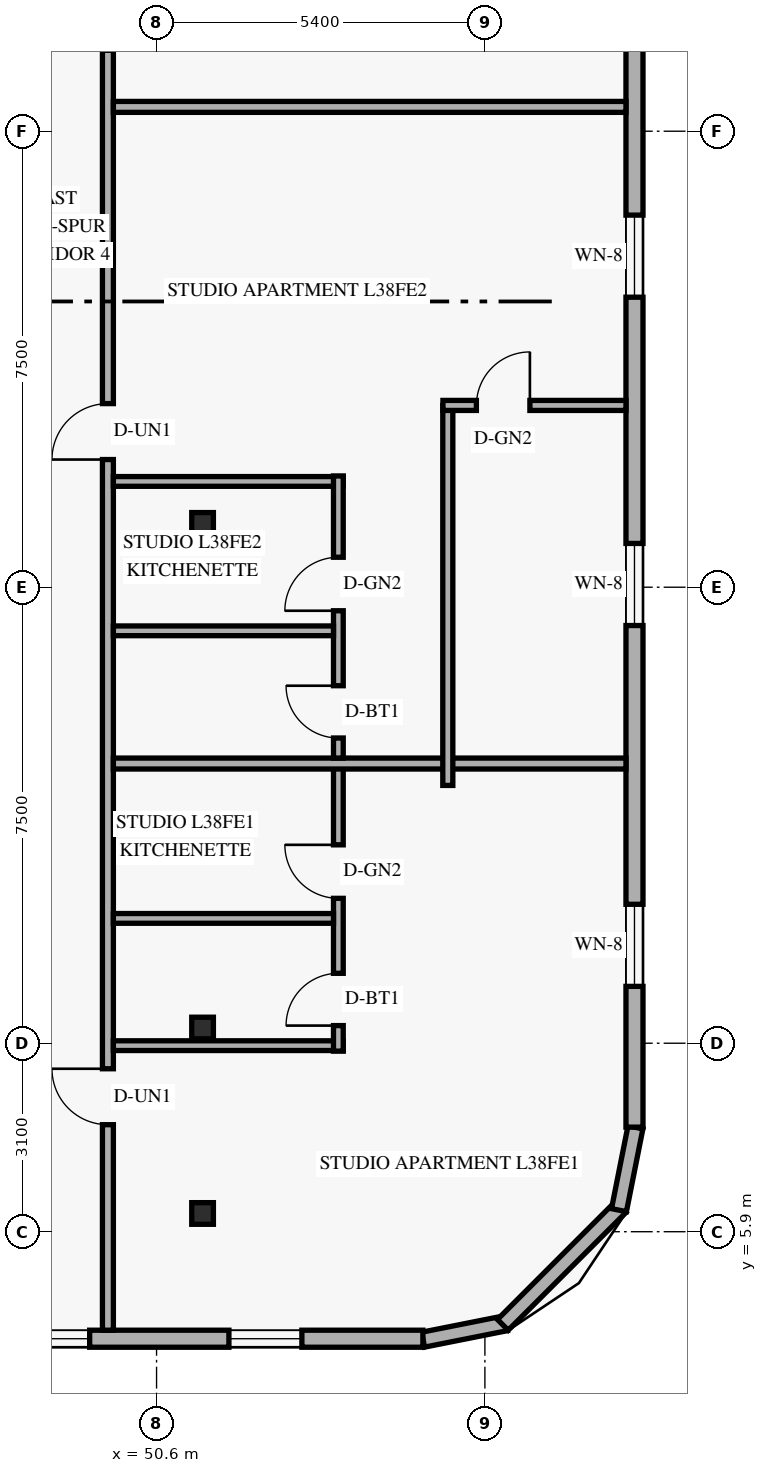
"""IFC4 building model, lengths in metres.
Left out: names, types, materials, properties, quantities, classifications, styles, units other than length and angle.
Written with IfcOpenShell. Run it as: python <this file> out.ifc"""

import sys

from ifc_helpers import new_model, si_unit, direction, frame, frame_2d, origin, origin_2d, place, context, subcontext, project, spatial, rectangle, hollow_rectangle, extrude, element, fill, save


model = new_model("IFC4")
c1 = context("Model", 3, precision=1e-05, world=origin(), true_north=direction((0.0, 1.0)))
c2 = subcontext(c1, "Body", "Model", "MODEL_VIEW")
j1 = project(units=[si_unit("LENGTHUNIT", "METRE"), si_unit("PLANEANGLEUNIT", "RADIAN")], contexts=[c1])
p1 = place(None, origin())
s1 = spatial("IfcSite", under=j1, at=p1, CompositionType="ELEMENT")
p2 = place(p1, origin())
s2 = spatial("IfcBuilding", under=s1, at=p2, CompositionType="ELEMENT")
p3 = place(p2, frame((0.0, 0.0, 148.2)))
s3 = spatial("IfcBuildingStorey", under=s2, at=p3, CompositionType="ELEMENT", Elevation=148.2)
for number, where, z_axis, x_axis in (
    (1, (51.252, 6.2, 0.0), (0.058, 0.0, 0.998), (0.0, 1.0, 0.0)),
    (2, (51.252, 9.25, 0.0), (0.058, 0.0, 0.998), (0.0, 1.0, 0.0)),
    (3, (51.252, 17.55, 0.0), (0.058, 0.0, 0.998), (0.0, 1.0, 0.0)),
):
    element("IfcColumn", number, at=place(p3, frame(where, z_axis=z_axis, x_axis=x_axis)), inside=s3, PredefinedType="COLUMN", context=c2, shape_type="SweptSolid", body=[
        extrude(hollow_rectangle(XDim=0.356, YDim=0.356, WallThickness=0.016, at=origin_2d()), origin(), (0.0, 0.0, 1.0), 3.606),
    ])
p4 = place(p3, frame((54.983, 4.124, 0.0), z_axis=(0.0, 0.0, 1.0), x_axis=(0.980809899341, 0.19496651342, 0.0)))
e4 = element("IfcWall", 4, at=p4, inside=s3, PredefinedType="SOLIDWALL", context=c2, shape_type="SweptSolid", body=[
    extrude(rectangle(XDim=1.389, YDim=0.25, at=frame_2d((0.694, 0.0))), origin(), (0.0, 0.0, 1.0), 3.36),
])
p5 = place(p3, frame((56.295, 4.368, 0.0), z_axis=(0.0, 0.0, 1.0), x_axis=(0.707106781187, 0.707106781187, 0.0)))
e5 = element("IfcWall", 5, at=p5, inside=s3, PredefinedType="SOLIDWALL", context=c2, shape_type="SweptSolid", body=[
    extrude(rectangle(XDim=2.739, YDim=0.25, at=frame_2d((1.37, 0.0))), origin(), (0.0, 0.0, 1.0), 3.36),
])
p6 = place(p3, frame((58.205, 6.254, 0.0), z_axis=(0.0, 0.0, 1.0), x_axis=(0.19496651342, 0.980809899341, 0.0)))
e6 = element("IfcWall", 6, at=p6, inside=s3, PredefinedType="SOLIDWALL", context=c2, shape_type="SweptSolid", body=[
    extrude(rectangle(XDim=1.389, YDim=0.25, at=frame_2d((0.694, 0.0))), origin(), (0.0, 0.0, 1.0), 3.36),
])
p7 = place(p3, frame((21.22, 4.14, 0.0), z_axis=(0.0, 0.0, 1.0), x_axis=(1.0, 0.0, 0.0)))
e7 = element("IfcWall", 7, at=p7, inside=s3, PredefinedType="SOLIDWALL", context=c2, shape_type="SweptSolid", body=[
    extrude(rectangle(XDim=33.76, YDim=0.28, at=frame_2d((16.88, 0.0))), origin(), (0.0, 0.0, 1.0), 3.36),
])
p8 = place(p7, frame((2.905, 0.0, 0.85)))
e8 = element("IfcOpeningElement", 8, at=p8, cuts=e7, PredefinedType="OPENING", context=c2, shape_type="SweptSolid", body=[
    extrude(rectangle(XDim=1.2, YDim=1.5, at=frame_2d((0.6, 0.75))), frame((0.0, 0.15, 0.0), z_axis=(0.0, -1.0, 0.0), x_axis=(1.0, 0.0, 0.0)), (0.0, 0.0, 1.0), 0.3),
])
p9 = place(p7, frame((9.79, 0.0, 0.85)))
e9 = element("IfcOpeningElement", 9, at=p9, cuts=e7, PredefinedType="OPENING", context=c2, shape_type="SweptSolid", body=[
    extrude(rectangle(XDim=1.2, YDim=1.5, at=frame_2d((0.6, 0.75))), frame((0.0, 0.15, 0.0), z_axis=(0.0, -1.0, 0.0), x_axis=(1.0, 0.0, 0.0)), (0.0, 0.0, 1.0), 0.3),
])
p10 = place(p7, frame((15.065, 0.0, 0.85)))
e10 = element("IfcOpeningElement", 10, at=p10, cuts=e7, PredefinedType="OPENING", context=c2, shape_type="SweptSolid", body=[
    extrude(rectangle(XDim=1.2, YDim=1.5, at=frame_2d((0.6, 0.75))), frame((0.0, 0.15, 0.0), z_axis=(0.0, -1.0, 0.0), x_axis=(1.0, 0.0, 0.0)), (0.0, 0.0, 1.0), 0.3),
])
p11 = place(p7, frame((19.625, 0.0, 0.85)))
e11 = element("IfcOpeningElement", 11, at=p11, cuts=e7, PredefinedType="OPENING", context=c2, shape_type="SweptSolid", body=[
    extrude(rectangle(XDim=1.2, YDim=1.5, at=frame_2d((0.6, 0.75))), frame((0.0, 0.15, 0.0), z_axis=(0.0, -1.0, 0.0), x_axis=(1.0, 0.0, 0.0)), (0.0, 0.0, 1.0), 0.3),
])
p12 = place(p7, frame((24.45, 0.0, 0.85)))
e12 = element("IfcOpeningElement", 12, at=p12, cuts=e7, PredefinedType="OPENING", context=c2, shape_type="SweptSolid", body=[
    extrude(rectangle(XDim=1.2, YDim=1.5, at=frame_2d((0.6, 0.75))), frame((0.0, 0.15, 0.0), z_axis=(0.0, -1.0, 0.0), x_axis=(1.0, 0.0, 0.0)), (0.0, 0.0, 1.0), 0.3),
])
p13 = place(p7, frame((27.08, 0.0, 0.85)))
e13 = element("IfcOpeningElement", 13, at=p13, cuts=e7, PredefinedType="OPENING", context=c2, shape_type="SweptSolid", body=[
    extrude(rectangle(XDim=1.2, YDim=1.5, at=frame_2d((0.6, 0.75))), frame((0.0, 0.15, 0.0), z_axis=(0.0, -1.0, 0.0), x_axis=(1.0, 0.0, 0.0)), (0.0, 0.0, 1.0), 0.3),
])
p14 = place(p7, frame((30.57, 0.0, 0.85)))
e14 = element("IfcOpeningElement", 14, at=p14, cuts=e7, PredefinedType="OPENING", context=c2, shape_type="SweptSolid", body=[
    extrude(rectangle(XDim=1.2, YDim=1.5, at=frame_2d((0.6, 0.75))), frame((0.0, 0.15, 0.0), z_axis=(0.0, -1.0, 0.0), x_axis=(1.0, 0.0, 0.0)), (0.0, 0.0, 1.0), 0.3),
])
p15 = place(p3, frame((58.46, 7.62, 0.0), z_axis=(0.0, 0.0, 1.0), x_axis=(0.0, 1.0, 0.0)))
e15 = element("IfcWall", 15, at=p15, inside=s3, PredefinedType="SOLIDWALL", context=c2, shape_type="SweptSolid", body=[
    extrude(rectangle(XDim=32.76, YDim=0.28, at=frame_2d((16.38, 0.0))), origin(), (0.0, 0.0, 1.0), 3.36),
])
p16 = place(p15, frame((2.315, 0.0, 0.85)))
e16 = element("IfcOpeningElement", 16, at=p16, cuts=e15, PredefinedType="OPENING", context=c2, shape_type="SweptSolid", body=[
    extrude(rectangle(XDim=1.35, YDim=1.55, at=frame_2d((0.675, 0.775))), frame((0.0, 0.15, 0.0), z_axis=(0.0, -1.0, 0.0), x_axis=(1.0, 0.0, 0.0)), (0.0, 0.0, 1.0), 0.3),
])
p17 = place(p15, frame((8.25, 0.0, 0.85)))
e17 = element("IfcOpeningElement", 17, at=p17, cuts=e15, PredefinedType="OPENING", context=c2, shape_type="SweptSolid", body=[
    extrude(rectangle(XDim=1.35, YDim=1.55, at=frame_2d((0.675, 0.775))), frame((0.0, 0.15, 0.0), z_axis=(0.0, -1.0, 0.0), x_axis=(1.0, 0.0, 0.0)), (0.0, 0.0, 1.0), 0.3),
])
p18 = place(p15, frame((13.65, 0.0, 0.85)))
e18 = element("IfcOpeningElement", 18, at=p18, cuts=e15, PredefinedType="OPENING", context=c2, shape_type="SweptSolid", body=[
    extrude(rectangle(XDim=1.35, YDim=1.55, at=frame_2d((0.675, 0.775))), frame((0.0, 0.15, 0.0), z_axis=(0.0, -1.0, 0.0), x_axis=(1.0, 0.0, 0.0)), (0.0, 0.0, 1.0), 0.3),
])
p19 = place(p15, frame((19.574, 0.0, 0.85)))
e19 = element("IfcOpeningElement", 19, at=p19, cuts=e15, PredefinedType="OPENING", context=c2, shape_type="SweptSolid", body=[
    extrude(rectangle(XDim=1.35, YDim=1.55, at=frame_2d((0.675, 0.775))), frame((0.0, 0.15, 0.0), z_axis=(0.0, -1.0, 0.0), x_axis=(1.0, 0.0, 0.0)), (0.0, 0.0, 1.0), 0.3),
])
p20 = place(p15, frame((24.774, 0.0, 0.85)))
e20 = element("IfcOpeningElement", 20, at=p20, cuts=e15, PredefinedType="OPENING", context=c2, shape_type="SweptSolid", body=[
    extrude(rectangle(XDim=1.35, YDim=1.55, at=frame_2d((0.675, 0.775))), frame((0.0, 0.15, 0.0), z_axis=(0.0, -1.0, 0.0), x_axis=(1.0, 0.0, 0.0)), (0.0, 0.0, 1.0), 0.3),
])
p21 = place(p15, frame((29.295, 0.0, 0.85)))
e21 = element("IfcOpeningElement", 21, at=p21, cuts=e15, PredefinedType="OPENING", context=c2, shape_type="SweptSolid", body=[
    extrude(rectangle(XDim=1.35, YDim=1.55, at=frame_2d((0.675, 0.775))), frame((0.0, 0.15, 0.0), z_axis=(0.0, -1.0, 0.0), x_axis=(1.0, 0.0, 0.0)), (0.0, 0.0, 1.0), 0.3),
])
p22 = place(p3, frame((49.8, 4.28, 0.0), z_axis=(0.0, 0.0, 1.0), x_axis=(0.0, 1.0, 0.0)))
e22 = element("IfcWall", 22, at=p22, inside=s3, PredefinedType="STANDARD", context=c2, shape_type="SweptSolid", body=[
    extrude(rectangle(XDim=39.44, YDim=0.18, at=frame_2d((19.72, 0.0))), origin(), (0.0, 0.0, 1.0), 2.73),
])
p23 = place(p22, frame((3.38, 0.0, 0.0)))
e23 = element("IfcOpeningElement", 23, at=p23, cuts=e22, PredefinedType="OPENING", context=c2, shape_type="SweptSolid", body=[
    extrude(rectangle(XDim=0.92, YDim=2.15, at=frame_2d((0.46, 1.075))), frame((0.0, 0.1, 0.0), z_axis=(0.0, -1.0, 0.0), x_axis=(1.0, 0.0, 0.0)), (0.0, 0.0, 1.0), 0.2),
])
p24 = place(p22, frame((14.32, 0.0, 0.0)))
e24 = element("IfcOpeningElement", 24, at=p24, cuts=e22, PredefinedType="OPENING", context=c2, shape_type="SweptSolid", body=[
    extrude(rectangle(XDim=0.92, YDim=2.15, at=frame_2d((0.46, 1.075))), frame((0.0, 0.1, 0.0), z_axis=(0.0, -1.0, 0.0), x_axis=(1.0, 0.0, 0.0)), (0.0, 0.0, 1.0), 0.2),
])
p25 = place(p22, frame((21.05, 0.0, 0.0)))
e25 = element("IfcOpeningElement", 25, at=p25, cuts=e22, PredefinedType="OPENING", context=c2, shape_type="SweptSolid", body=[
    extrude(rectangle(XDim=0.92, YDim=2.15, at=frame_2d((0.46, 1.075))), frame((0.0, 0.1, 0.0), z_axis=(0.0, -1.0, 0.0), x_axis=(1.0, 0.0, 0.0)), (0.0, 0.0, 1.0), 0.2),
])
p26 = place(p22, frame((35.42, 0.0, 0.0)))
e26 = element("IfcOpeningElement", 26, at=p26, cuts=e22, PredefinedType="OPENING", context=c2, shape_type="SweptSolid", body=[
    extrude(rectangle(XDim=0.92, YDim=2.15, at=frame_2d((0.46, 1.075))), frame((0.0, 0.1, 0.0), z_axis=(0.0, -1.0, 0.0), x_axis=(1.0, 0.0, 0.0)), (0.0, 0.0, 1.0), 0.2),
])
p27 = place(p3, frame((49.89, 8.96, 0.0), z_axis=(0.0, 0.0, 1.0), x_axis=(1.0, 0.0, 0.0)))
e27 = element("IfcWall", 27, at=p27, inside=s3, PredefinedType="PLUMBINGWALL", context=c2, shape_type="SweptSolid", body=[
    extrude(rectangle(XDim=3.78, YDim=0.16, at=frame_2d((1.89, 0.0))), origin(), (0.0, 0.0, 1.0), 2.879),
])
p28 = place(p3, frame((53.59, 8.87, 0.0), z_axis=(0.0, 0.0, 1.0), x_axis=(0.0, 1.0, 0.0)))
e28 = element("IfcWall", 28, at=p28, inside=s3, PredefinedType="PLUMBINGWALL", context=c2, shape_type="SweptSolid", body=[
    extrude(rectangle(XDim=4.73, YDim=0.16, at=frame_2d((2.365, 0.0))), origin(), (0.0, 0.0, 1.0), 3.36),
])
p29 = place(p28, frame((0.42, 0.0, 0.0)))
e29 = element("IfcOpeningElement", 29, at=p29, cuts=e28, PredefinedType="OPENING", context=c2, shape_type="SweptSolid", body=[
    extrude(rectangle(XDim=0.86, YDim=2.12, at=frame_2d((0.43, 1.06))), frame((0.0, 0.09, 0.0), z_axis=(0.0, -1.0, 0.0), x_axis=(1.0, 0.0, 0.0)), (0.0, 0.0, 1.0), 0.18),
])
p30 = place(p28, frame((2.513, 0.0, 0.0)))
e30 = element("IfcOpeningElement", 30, at=p30, cuts=e28, PredefinedType="OPENING", context=c2, shape_type="SweptSolid", body=[
    extrude(rectangle(XDim=0.88, YDim=2.12, at=frame_2d((0.44, 1.06))), frame((0.0, 0.09, 0.0), z_axis=(0.0, -1.0, 0.0), x_axis=(1.0, 0.0, 0.0)), (0.0, 0.0, 1.0), 0.18),
])
p31 = place(p3, frame((49.89, 11.053, 0.0), z_axis=(0.0, 0.0, 1.0), x_axis=(1.0, 0.0, 0.0)))
e31 = element("IfcWall", 31, at=p31, inside=s3, PredefinedType="PLUMBINGWALL", context=c2, shape_type="SweptSolid", body=[
    extrude(rectangle(XDim=3.62, YDim=0.16, at=frame_2d((1.81, 0.0))), origin(), (0.0, 0.0, 1.0), 2.879),
])
p32 = place(p3, frame((49.89, 13.6, 0.0), z_axis=(0.0, 0.0, 1.0), x_axis=(1.0, 0.0, 0.0)))
e32 = element("IfcWall", 32, at=p32, inside=s3, PredefinedType="PARTITIONING", context=c2, shape_type="SweptSolid", body=[
    extrude(rectangle(XDim=8.43, YDim=0.18, at=frame_2d((4.215, 0.0))), origin(), (0.0, 0.0, 1.0), 2.879),
])
p33 = place(p3, frame((49.89, 18.24, 0.0), z_axis=(0.0, 0.0, 1.0), x_axis=(1.0, 0.0, 0.0)))
e33 = element("IfcWall", 33, at=p33, inside=s3, PredefinedType="PLUMBINGWALL", context=c2, shape_type="SweptSolid", body=[
    extrude(rectangle(XDim=3.78, YDim=0.16, at=frame_2d((1.89, 0.0))), origin(), (0.0, 0.0, 1.0), 2.879),
])
p34 = place(p3, frame((53.59, 13.69, 0.0), z_axis=(0.0, 0.0, 1.0), x_axis=(0.0, 1.0, 0.0)))
e34 = element("IfcWall", 34, at=p34, inside=s3, PredefinedType="PLUMBINGWALL", context=c2, shape_type="SweptSolid", body=[
    extrude(rectangle(XDim=4.64, YDim=0.16, at=frame_2d((2.32, 0.0))), origin(), (0.0, 0.0, 1.0), 3.36),
])
p35 = place(p34, frame((0.33, 0.0, 0.0)))
e35 = element("IfcOpeningElement", 35, at=p35, cuts=e34, PredefinedType="OPENING", context=c2, shape_type="SweptSolid", body=[
    extrude(rectangle(XDim=0.86, YDim=2.12, at=frame_2d((0.43, 1.06))), frame((0.0, 0.09, 0.0), z_axis=(0.0, -1.0, 0.0), x_axis=(1.0, 0.0, 0.0)), (0.0, 0.0, 1.0), 0.18),
])
p36 = place(p34, frame((2.423, 0.0, 0.0)))
e36 = element("IfcOpeningElement", 36, at=p36, cuts=e34, PredefinedType="OPENING", context=c2, shape_type="SweptSolid", body=[
    extrude(rectangle(XDim=0.88, YDim=2.12, at=frame_2d((0.44, 1.06))), frame((0.0, 0.09, 0.0), z_axis=(0.0, -1.0, 0.0), x_axis=(1.0, 0.0, 0.0)), (0.0, 0.0, 1.0), 0.18),
])
p37 = place(p3, frame((49.89, 15.783, 0.0), z_axis=(0.0, 0.0, 1.0), x_axis=(1.0, 0.0, 0.0)))
e37 = element("IfcWall", 37, at=p37, inside=s3, PredefinedType="PLUMBINGWALL", context=c2, shape_type="SweptSolid", body=[
    extrude(rectangle(XDim=3.62, YDim=0.16, at=frame_2d((1.81, 0.0))), origin(), (0.0, 0.0, 1.0), 2.879),
])
p38 = place(p3, frame((55.39, 13.24, 0.0), z_axis=(0.0, 0.0, 1.0), x_axis=(0.0, 1.0, 0.0)))
e38 = element("IfcWall", 38, at=p38, inside=s3, PredefinedType="PARTITIONING", context=c2, shape_type="SweptSolid", body=[
    extrude(rectangle(XDim=6.25, YDim=0.165, at=frame_2d((3.125, 0.0))), origin(), (0.0, 0.0, 1.0), 3.36),
])
p39 = place(p3, frame((55.31, 19.49, 0.0), z_axis=(0.0, 0.0, 1.0), x_axis=(1.0, 0.0, 0.0)))
e39 = element("IfcWall", 39, at=p39, inside=s3, PredefinedType="PARTITIONING", context=c2, shape_type="SweptSolid", body=[
    extrude(rectangle(XDim=3.01, YDim=0.165, at=frame_2d((1.505, 0.0))), origin(), (0.0, 0.0, 1.0), 3.36),
])
p40 = place(p39, frame((0.55, 0.0, 0.0)))
e40 = element("IfcOpeningElement", 40, at=p40, cuts=e39, PredefinedType="OPENING", context=c2, shape_type="SweptSolid", body=[
    extrude(rectangle(XDim=0.88, YDim=2.12, at=frame_2d((0.44, 1.06))), frame((0.0, 0.093, 0.0), z_axis=(0.0, -1.0, 0.0), x_axis=(1.0, 0.0, 0.0)), (0.0, 0.0, 1.0), 0.185),
])
p41 = place(p3, frame((49.89, 24.4, 0.0), z_axis=(0.0, 0.0, 1.0), x_axis=(1.0, 0.0, 0.0)))
e41 = element("IfcWall", 41, at=p41, inside=s3, PredefinedType="PARTITIONING", context=c2, shape_type="SweptSolid", body=[
    extrude(rectangle(XDim=8.43, YDim=0.18, at=frame_2d((4.215, 0.0))), origin(), (0.0, 0.0, 1.0), 2.879),
])
p42 = place(p13, origin())
e42 = element("IfcWindow", 42, at=p42, inside=s3, PartitioningType="SINGLE_PANEL", PredefinedType="WINDOW", context=c2, shape_type="SweptSolid", body=[
    extrude(rectangle(XDim=1.2, YDim=1.5, at=frame_2d((0.6, 0.75))), frame((0.0, 0.03, 0.0), z_axis=(0.0, -1.0, 0.0), x_axis=(1.0, 0.0, 0.0)), (0.0, 0.0, 1.0), 0.06),
])
fill(e13, e42)
p43 = place(p14, origin())
e43 = element("IfcWindow", 43, at=p43, inside=s3, PartitioningType="SINGLE_PANEL", PredefinedType="WINDOW", context=c2, shape_type="SweptSolid", body=[
    extrude(rectangle(XDim=1.2, YDim=1.5, at=frame_2d((0.6, 0.75))), frame((0.0, 0.03, 0.0), z_axis=(0.0, -1.0, 0.0), x_axis=(1.0, 0.0, 0.0)), (0.0, 0.0, 1.0), 0.06),
])
fill(e14, e43)
p44 = place(p16, origin())
e44 = element("IfcWindow", 44, at=p44, inside=s3, PartitioningType="SINGLE_PANEL", PredefinedType="WINDOW", context=c2, shape_type="SweptSolid", body=[
    extrude(rectangle(XDim=1.35, YDim=1.55, at=frame_2d((0.675, 0.775))), frame((0.0, 0.03, 0.0), z_axis=(0.0, -1.0, 0.0), x_axis=(1.0, 0.0, 0.0)), (0.0, 0.0, 1.0), 0.06),
])
fill(e16, e44)
p45 = place(p17, origin())
e45 = element("IfcWindow", 45, at=p45, inside=s3, PartitioningType="SINGLE_PANEL", PredefinedType="WINDOW", context=c2, shape_type="SweptSolid", body=[
    extrude(rectangle(XDim=1.35, YDim=1.55, at=frame_2d((0.675, 0.775))), frame((0.0, 0.03, 0.0), z_axis=(0.0, -1.0, 0.0), x_axis=(1.0, 0.0, 0.0)), (0.0, 0.0, 1.0), 0.06),
])
fill(e17, e45)
p46 = place(p18, origin())
e46 = element("IfcWindow", 46, at=p46, inside=s3, PartitioningType="SINGLE_PANEL", PredefinedType="WINDOW", context=c2, shape_type="SweptSolid", body=[
    extrude(rectangle(XDim=1.35, YDim=1.55, at=frame_2d((0.675, 0.775))), frame((0.0, 0.03, 0.0), z_axis=(0.0, -1.0, 0.0), x_axis=(1.0, 0.0, 0.0)), (0.0, 0.0, 1.0), 0.06),
])
fill(e18, e46)
p47 = place(p23, origin())
e47 = element("IfcDoor", 47, at=p47, inside=s3, OperationType="SINGLE_SWING_RIGHT", PredefinedType="DOOR", context=c2, shape_type="SweptSolid", body=[
    extrude(rectangle(XDim=0.92, YDim=2.15, at=frame_2d((0.46, 1.075))), frame((0.0, 0.025, 0.0), z_axis=(0.0, -1.0, 0.0), x_axis=(1.0, 0.0, 0.0)), (0.0, 0.0, 1.0), 0.05),
])
fill(e23, e47)
p48 = place(p29, origin())
e48 = element("IfcDoor", 48, at=p48, inside=s3, OperationType="SINGLE_SWING_LEFT", PredefinedType="DOOR", context=c2, shape_type="SweptSolid", body=[
    extrude(rectangle(XDim=0.86, YDim=2.12, at=frame_2d((0.43, 1.06))), frame((0.0, 0.025, 0.0), z_axis=(0.0, -1.0, 0.0), x_axis=(1.0, 0.0, 0.0)), (0.0, 0.0, 1.0), 0.05),
])
fill(e29, e48)
p49 = place(p30, origin())
e49 = element("IfcDoor", 49, at=p49, inside=s3, OperationType="SINGLE_SWING_RIGHT", PredefinedType="DOOR", context=c2, shape_type="SweptSolid", body=[
    extrude(rectangle(XDim=0.88, YDim=2.12, at=frame_2d((0.44, 1.06))), frame((0.0, 0.025, 0.0), z_axis=(0.0, -1.0, 0.0), x_axis=(1.0, 0.0, 0.0)), (0.0, 0.0, 1.0), 0.05),
])
fill(e30, e49)
p50 = place(p40, origin())
e50 = element("IfcDoor", 50, at=p50, inside=s3, OperationType="SINGLE_SWING_RIGHT", PredefinedType="DOOR", context=c2, shape_type="SweptSolid", body=[
    extrude(rectangle(XDim=0.88, YDim=2.12, at=frame_2d((0.44, 1.06))), frame((0.0, 0.025, 0.0), z_axis=(0.0, -1.0, 0.0), x_axis=(1.0, 0.0, 0.0)), (0.0, 0.0, 1.0), 0.05),
])
fill(e40, e50)
p51 = place(p24, origin())
e51 = element("IfcDoor", 51, at=p51, inside=s3, OperationType="SINGLE_SWING_LEFT", PredefinedType="DOOR", context=c2, shape_type="SweptSolid", body=[
    extrude(rectangle(XDim=0.92, YDim=2.15, at=frame_2d((0.46, 1.075))), frame((0.0, 0.025, 0.0), z_axis=(0.0, -1.0, 0.0), x_axis=(1.0, 0.0, 0.0)), (0.0, 0.0, 1.0), 0.05),
])
fill(e24, e51)
p52 = place(p35, origin())
e52 = element("IfcDoor", 52, at=p52, inside=s3, OperationType="SINGLE_SWING_RIGHT", PredefinedType="DOOR", context=c2, shape_type="SweptSolid", body=[
    extrude(rectangle(XDim=0.86, YDim=2.12, at=frame_2d((0.43, 1.06))), frame((0.0, 0.025, 0.0), z_axis=(0.0, -1.0, 0.0), x_axis=(1.0, 0.0, 0.0)), (0.0, 0.0, 1.0), 0.05),
])
fill(e35, e52)
p53 = place(p36, origin())
e53 = element("IfcDoor", 53, at=p53, inside=s3, OperationType="SINGLE_SWING_LEFT", PredefinedType="DOOR", context=c2, shape_type="SweptSolid", body=[
    extrude(rectangle(XDim=0.88, YDim=2.12, at=frame_2d((0.44, 1.06))), frame((0.0, 0.025, 0.0), z_axis=(0.0, -1.0, 0.0), x_axis=(1.0, 0.0, 0.0)), (0.0, 0.0, 1.0), 0.05),
])
fill(e36, e53)
save(model, sys.argv[1])
